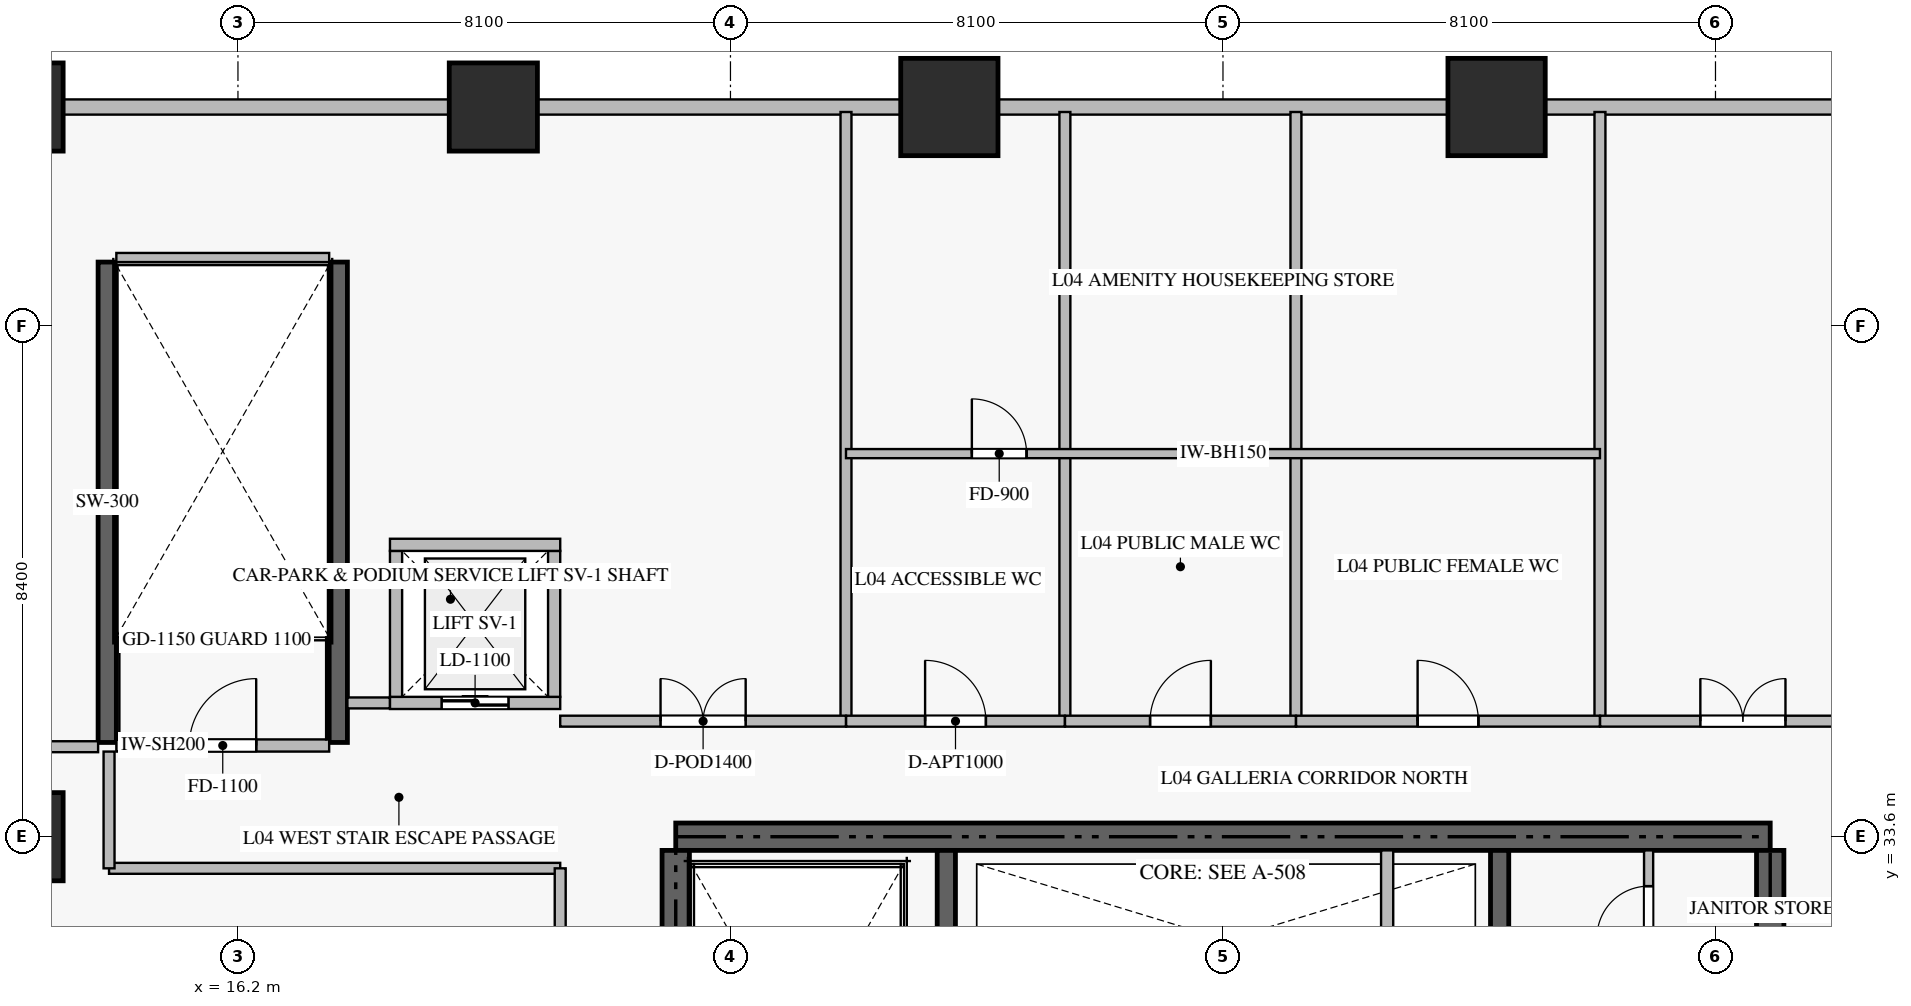
"""IFC4 building model, lengths in metres.
Left out: names, types, materials, properties, quantities, classifications, styles, units other than length and angle.
Written with IfcOpenShell. Run it as: python <this file> out.ifc"""

import sys

from ifc_helpers import new_model, si_unit, direction, frame, frame_2d, origin, origin_2d, place, context, subcontext, project, spatial, rectangle, extrude, source, transform, mapped, element, fill, save


model = new_model("IFC4")
c1 = context("Model", 3, precision=1e-05, world=origin(), true_north=direction((0.0, 1.0)))
c2 = subcontext(c1, "Body", "Model", "MODEL_VIEW")
j1 = project(units=[si_unit("LENGTHUNIT", "METRE"), si_unit("PLANEANGLEUNIT", "RADIAN")], contexts=[c1])
p1 = place(None, origin())
s1 = spatial("IfcSite", under=j1, at=p1, CompositionType="ELEMENT")
p2 = place(p1, origin())
s2 = spatial("IfcBuilding", under=s1, at=p2, CompositionType="ELEMENT")
p3 = place(p2, frame((0.0, 0.0, 21.0)))
s3 = spatial("IfcBuildingStorey", under=s2, at=p3, CompositionType="ELEMENT", Elevation=21.0)
p4 = place(p3, frame((41.4, 33.6, -0.85), z_axis=(0.0, 0.0, 1.0), x_axis=(-1.0, 0.0, 0.0)))
e1 = element("IfcWall", 1, at=p4, inside=s3, PredefinedType="SHEAR", context=c2, shape_type="SweptSolid", body=[
    extrude(rectangle(XDim=18.0, YDim=0.45, at=frame_2d((9.0, 0.0))), origin(), (0.0, 0.0, 1.0), 6.108),
])
p5 = place(p3, frame((23.4, 24.25, -0.85), z_axis=(0.0, 0.0, 1.0), x_axis=(0.0, 1.0, 0.0)))
e2 = element("IfcWall", 2, at=p5, inside=s3, PredefinedType="SHEAR", context=c2, shape_type="SweptSolid", body=[
    extrude(rectangle(XDim=9.125, YDim=0.45, at=frame_2d((4.562, 0.0))), origin(), (0.0, 0.0, 1.0), 6.108),
])
p6 = place(p3, frame((41.4, 27.75, -0.85), z_axis=(0.0, 0.0, 1.0), x_axis=(0.0, 1.0, 0.0)))
e3 = element("IfcWall", 3, at=p6, inside=s3, PredefinedType="SHEAR", context=c2, shape_type="SweptSolid", body=[
    extrude(rectangle(XDim=5.625, YDim=0.45, at=frame_2d((2.812, 0.0))), origin(), (0.0, 0.0, 1.0), 6.108),
])
p7 = place(p3, frame((27.85, 23.55, -0.85), z_axis=(0.0, 0.0, 1.0), x_axis=(0.0, 1.0, 0.0)))
e4 = element("IfcWall", 4, at=p7, inside=s3, PredefinedType="SHEAR", context=c2, shape_type="SweptSolid", body=[
    extrude(rectangle(XDim=9.825, YDim=0.3, at=frame_2d((4.913, 0.0))), origin(), (0.0, 0.0, 1.0), 6.108),
])
p8 = place(p3, frame((36.95, 27.05, -0.85), z_axis=(0.0, 0.0, 1.0), x_axis=(0.0, 1.0, 0.0)))
e5 = element("IfcWall", 5, at=p8, inside=s3, PredefinedType="SHEAR", context=c2, shape_type="SweptSolid", body=[
    extrude(rectangle(XDim=6.325, YDim=0.3, at=frame_2d((3.163, 0.0))), origin(), (0.0, 0.0, 1.0), 6.108),
])
m1 = source(origin(), c2, "Body", "SweptSolid", [
    extrude(rectangle(XDim=1.45, YDim=1.45, at=origin_2d()), origin(), (0.0, 0.0, 1.0), 6.11),
])
for number, where, z_axis, x_axis in (
    (6, (12.6, 45.6, -0.85), (0.0, 0.0, 1.0), (1.0, 0.0, 0.0)),
    (7, (20.4, 45.6, -0.85), (0.0, 0.0, 1.0), (1.0, 0.0, 0.0)),
):
    element("IfcColumn", number, at=place(p3, frame(where, z_axis=z_axis, x_axis=x_axis)), inside=s3, PredefinedType="COLUMN", context=c2, shape_type="MappedRepresentation", body=[
        mapped(m1, transform((0.0, 0.0, 0.0), scale=1.0)),
    ])
m2 = source(origin(), c2, "Body", "SweptSolid", [
    extrude(rectangle(XDim=1.6, YDim=1.6, at=origin_2d()), origin(), (0.0, 0.0, 1.0), 6.11),
])
for number, where, z_axis, x_axis in (
    (8, (27.9, 45.6, -0.85), (0.0, 0.0, 1.0), (1.0, 0.0, 0.0)),
    (9, (36.9, 45.6, -0.85), (0.0, 0.0, 1.0), (1.0, 0.0, 0.0)),
):
    element("IfcColumn", number, at=place(p3, frame(where, z_axis=z_axis, x_axis=x_axis)), inside=s3, PredefinedType="COLUMN", context=c2, shape_type="MappedRepresentation", body=[
        mapped(m2, transform((0.0, 0.0, 0.0), scale=1.0)),
    ])
p9 = place(p3, frame((12.6, 33.6, -0.85), z_axis=(0.0, 0.0, 1.0), x_axis=(1.0, 0.0, 0.0)))
e10 = element("IfcColumn", 10, at=p9, inside=s3, PredefinedType="COLUMN", context=c2, shape_type="MappedRepresentation", body=[
    mapped(m1, transform((0.0, 0.0, 0.0), scale=1.0)),
])
p10 = place(p3, frame((60.875, 45.6, 0.0), z_axis=(0.0, 0.0, 1.0), x_axis=(-1.0, 0.0, 0.0)))
e11 = element("IfcWall", 11, at=p10, inside=s3, PredefinedType="ELEMENTEDWALL", context=c2, shape_type="SweptSolid", body=[
    extrude(rectangle(XDim=56.95, YDim=0.25, at=frame_2d((28.475, 0.0))), origin(), (0.0, 0.0, 1.0), 2.845),
])
for number, where, z_axis, x_axis in (
    (12, (14.05, 35.15, -0.85), (0.0, 0.0, 1.0), (0.0, 1.0, 0.0)),
    (13, (17.85, 35.15, -0.85), (0.0, 0.0, 1.0), (0.0, 1.0, 0.0)),
):
    element("IfcWall", number, at=place(p3, frame(where, z_axis=z_axis, x_axis=x_axis)), inside=s3, PredefinedType="SHEAR", context=c2, shape_type="SweptSolid", body=[
        extrude(rectangle(XDim=7.9, YDim=0.3, at=frame_2d((3.95, 0.0))), origin(), (0.0, 0.0, 1.0), 6.108),
    ])
p11 = place(p3, frame((14.2, 35.1, 0.0), z_axis=(0.0, 0.0, 1.0), x_axis=(1.0, 0.0, 0.0)))
e14 = element("IfcWall", 14, at=p11, inside=s3, PredefinedType="STANDARD", context=c2, shape_type="SweptSolid", body=[
    extrude(rectangle(XDim=3.5, YDim=0.2, at=frame_2d((1.75, 0.0))), origin(), (0.0, 0.0, 1.0), 5.26),
])
p12 = place(p11, frame((1.2, 0.0, 0.0)))
e15 = element("IfcOpeningElement", 15, at=p12, cuts=e14, PredefinedType="OPENING", context=c2, shape_type="SweptSolid", body=[
    extrude(rectangle(XDim=1.1, YDim=2.15, at=frame_2d((0.55, 1.075))), frame((0.0, 0.11, 0.0), z_axis=(0.0, -1.0, 0.0), x_axis=(1.0, 0.0, 0.0)), (0.0, 0.0, 1.0), 0.22),
])
p13 = place(p3, frame((14.2, 43.1, 0.0), z_axis=(0.0, 0.0, 1.0), x_axis=(1.0, 0.0, 0.0)))
e16 = element("IfcWall", 16, at=p13, inside=s3, PredefinedType="STANDARD", context=c2, shape_type="SweptSolid", body=[
    extrude(rectangle(XDim=3.5, YDim=0.2, at=frame_2d((1.75, 0.0))), origin(), (0.0, 0.0, 1.0), 5.26),
])
p14 = place(p3, frame((35.1, 30.75, 0.0), z_axis=(0.0, 0.0, 1.0), x_axis=(0.0, 1.0, 0.0)))
e17 = element("IfcWall", 17, at=p14, inside=s3, PredefinedType="STANDARD", context=c2, shape_type="SweptSolid", body=[
    extrude(rectangle(XDim=2.625, YDim=0.2, at=frame_2d((1.312, 0.0))), origin(), (0.0, 0.0, 1.0), 5.26),
])
p15 = place(p3, frame((18.7, 35.8, 0.0), z_axis=(0.0, 0.0, 1.0), x_axis=(1.0, 0.0, 0.0)))
e18 = element("IfcWall", 18, at=p15, inside=s3, PredefinedType="STANDARD", context=c2, shape_type="SweptSolid", body=[
    extrude(rectangle(XDim=2.8, YDim=0.2, at=frame_2d((1.4, 0.0))), origin(), (0.0, 0.0, 1.0), 5.26),
])
p16 = place(p15, frame((0.85, 0.0, 0.0)))
e19 = element("IfcOpeningElement", 19, at=p16, cuts=e18, PredefinedType="OPENING", context=c2, shape_type="SweptSolid", body=[
    extrude(rectangle(XDim=1.1, YDim=2.2, at=frame_2d((0.55, 1.1))), frame((0.0, 0.11, 0.0), z_axis=(0.0, -1.0, 0.0), x_axis=(1.0, 0.0, 0.0)), (0.0, 0.0, 1.0), 0.22),
])
for number, where, z_axis, x_axis in (
    (20, (18.8, 35.9, 0.0), (0.0, 0.0, 1.0), (0.0, 1.0, 0.0)),
    (21, (21.4, 35.9, 0.0), (0.0, 0.0, 1.0), (0.0, 1.0, 0.0)),
):
    element("IfcWall", number, at=place(p3, frame(where, z_axis=z_axis, x_axis=x_axis)), inside=s3, PredefinedType="STANDARD", context=c2, shape_type="SweptSolid", body=[
        extrude(rectangle(XDim=2.4, YDim=0.2, at=frame_2d((1.2, 0.0))), origin(), (0.0, 0.0, 1.0), 5.26),
    ])
p17 = place(p3, frame((18.7, 38.4, 0.0), z_axis=(0.0, 0.0, 1.0), x_axis=(1.0, 0.0, 0.0)))
e22 = element("IfcWall", 22, at=p17, inside=s3, PredefinedType="STANDARD", context=c2, shape_type="SweptSolid", body=[
    extrude(rectangle(XDim=2.8, YDim=0.2, at=frame_2d((1.4, 0.0))), origin(), (0.0, 0.0, 1.0), 5.26),
])
p18 = place(p3, frame((39.4, 31.35, 0.0), z_axis=(0.0, 0.0, 1.0), x_axis=(0.0, 1.0, 0.0)))
e23 = element("IfcWall", 23, at=p18, inside=s3, PredefinedType="PARTITIONING", context=c2, shape_type="SweptSolid", body=[
    extrude(rectangle(XDim=2.025, YDim=0.15, at=frame_2d((1.012, 0.0))), origin(), (0.0, 0.0, 1.0), 5.26),
])
p19 = place(p18, frame((0.587, 0.0, 0.0)))
e24 = element("IfcOpeningElement", 24, at=p19, cuts=e23, PredefinedType="OPENING", context=c2, shape_type="SweptSolid", body=[
    extrude(rectangle(XDim=0.85, YDim=2.1, at=frame_2d((0.425, 1.05))), frame((0.0, 0.085, 0.0), z_axis=(0.0, -1.0, 0.0), x_axis=(1.0, 0.0, 0.0)), (0.0, 0.0, 1.0), 0.17),
])
p20 = place(p3, frame((4.132, 35.08, 0.0), z_axis=(0.0, 0.0, 1.0), x_axis=(1.0, 0.0, 0.0)))
e25 = element("IfcWall", 25, at=p20, inside=s3, PredefinedType="PARTITIONING", context=c2, shape_type="SweptSolid", body=[
    extrude(rectangle(XDim=9.768, YDim=0.18, at=frame_2d((4.884, 0.0))), origin(), (0.0, 0.0, 1.0), 5.26),
])
p21 = place(p3, frame((14.08, 33.08, 0.0), z_axis=(0.0, 0.0, 1.0), x_axis=(1.0, 0.0, 0.0)))
e26 = element("IfcWall", 26, at=p21, inside=s3, PredefinedType="PARTITIONING", context=c2, shape_type="SweptSolid", body=[
    extrude(rectangle(XDim=7.42, YDim=0.18, at=frame_2d((3.71, 0.0))), origin(), (0.0, 0.0, 1.0), 2.845),
])
p22 = place(p3, frame((18.0, 35.8, 0.0), z_axis=(0.0, 0.0, 1.0), x_axis=(1.0, 0.0, 0.0)))
e27 = element("IfcWall", 27, at=p22, inside=s3, PredefinedType="PARTITIONING", context=c2, shape_type="SweptSolid", body=[
    extrude(rectangle(XDim=0.698, YDim=0.18, at=frame_2d((0.349, 0.0))), origin(), (0.0, 0.0, 1.0), 5.26),
])
p23 = place(p3, frame((14.08, 33.08, 0.0), z_axis=(0.0, 0.0, 1.0), x_axis=(0.0, 1.0, 0.0)))
e28 = element("IfcWall", 28, at=p23, inside=s3, PredefinedType="PARTITIONING", context=c2, shape_type="SweptSolid", body=[
    extrude(rectangle(XDim=1.92, YDim=0.18, at=frame_2d((0.96, 0.0))), origin(), (0.0, 0.0, 1.0), 5.26),
])
p24 = place(p3, frame((21.5, 14.9, 0.0), z_axis=(0.0, 0.0, 1.0), x_axis=(0.0, 1.0, 0.0)))
e29 = element("IfcWall", 29, at=p24, inside=s3, PredefinedType="PARTITIONING", context=c2, shape_type="SweptSolid", body=[
    extrude(rectangle(XDim=18.18, YDim=0.18, at=frame_2d((9.09, 0.0))), origin(), (0.0, 0.0, 1.0), 5.26),
])
p25 = place(p24, frame((8.34, 0.0, 0.0)))
e30 = element("IfcOpeningElement", 30, at=p25, cuts=e29, PredefinedType="OPENING", context=c2, shape_type="SweptSolid", body=[
    extrude(rectangle(XDim=1.5, YDim=2.25, at=frame_2d((0.75, 1.125))), frame((0.0, 0.1, 0.0), z_axis=(0.0, -1.0, 0.0), x_axis=(1.0, 0.0, 0.0)), (0.0, 0.0, 1.0), 0.2),
])
for number, where, z_axis, x_axis in (
    (31, (26.2, 35.5, 0.0), (0.0, 0.0, 1.0), (0.0, 1.0, 0.0)),
    (32, (29.8, 35.5, 0.0), (0.0, 0.0, 1.0), (0.0, 1.0, 0.0)),
    (33, (33.6, 35.5, 0.0), (0.0, 0.0, 1.0), (0.0, 1.0, 0.0)),
    (34, (38.6, 35.5, 0.0), (0.0, 0.0, 1.0), (0.0, 1.0, 0.0)),
):
    element("IfcWall", number, at=place(p3, frame(where, z_axis=z_axis, x_axis=x_axis)), inside=s3, PredefinedType="PARTITIONING", context=c2, shape_type="SweptSolid", body=[
        extrude(rectangle(XDim=10.018, YDim=0.18, at=frame_2d((5.009, 0.0))), origin(), (0.0, 0.0, 1.0), 5.26),
    ])
p26 = place(p3, frame((21.5, 35.5, 0.0), z_axis=(0.0, 0.0, 1.0), x_axis=(1.0, 0.0, 0.0)))
e35 = element("IfcWall", 35, at=p26, inside=s3, PredefinedType="PARTITIONING", context=c2, shape_type="SweptSolid", body=[
    extrude(rectangle(XDim=4.7, YDim=0.18, at=frame_2d((2.35, 0.0))), origin(), (0.0, 0.0, 1.0), 5.26),
])
p27 = place(p26, frame((1.65, 0.0, 0.0)))
e36 = element("IfcOpeningElement", 36, at=p27, cuts=e35, PredefinedType="OPENING", context=c2, shape_type="SweptSolid", body=[
    extrude(rectangle(XDim=1.4, YDim=2.25, at=frame_2d((0.7, 1.125))), frame((0.0, 0.1, 0.0), z_axis=(0.0, -1.0, 0.0), x_axis=(1.0, 0.0, 0.0)), (0.0, 0.0, 1.0), 0.2),
])
p28 = place(p3, frame((26.202, 35.5, 0.0), z_axis=(0.0, 0.0, 1.0), x_axis=(1.0, 0.0, 0.0)))
e37 = element("IfcWall", 37, at=p28, inside=s3, PredefinedType="PARTITIONING", context=c2, shape_type="SweptSolid", body=[
    extrude(rectangle(XDim=3.598, YDim=0.18, at=frame_2d((1.799, 0.0))), origin(), (0.0, 0.0, 1.0), 5.26),
])
p29 = place(p28, frame((1.299, 0.0, 0.0)))
e38 = element("IfcOpeningElement", 38, at=p29, cuts=e37, PredefinedType="OPENING", context=c2, shape_type="SweptSolid", body=[
    extrude(rectangle(XDim=1.0, YDim=2.15, at=frame_2d((0.5, 1.075))), frame((0.0, 0.1, 0.0), z_axis=(0.0, -1.0, 0.0), x_axis=(1.0, 0.0, 0.0)), (0.0, 0.0, 1.0), 0.2),
])
p30 = place(p3, frame((29.802, 35.5, 0.0), z_axis=(0.0, 0.0, 1.0), x_axis=(1.0, 0.0, 0.0)))
e39 = element("IfcWall", 39, at=p30, inside=s3, PredefinedType="PARTITIONING", context=c2, shape_type="SweptSolid", body=[
    extrude(rectangle(XDim=3.798, YDim=0.18, at=frame_2d((1.899, 0.0))), origin(), (0.0, 0.0, 1.0), 5.26),
])
p31 = place(p30, frame((1.399, 0.0, 0.0)))
e40 = element("IfcOpeningElement", 40, at=p31, cuts=e39, PredefinedType="OPENING", context=c2, shape_type="SweptSolid", body=[
    extrude(rectangle(XDim=1.0, YDim=2.15, at=frame_2d((0.5, 1.075))), frame((0.0, 0.1, 0.0), z_axis=(0.0, -1.0, 0.0), x_axis=(1.0, 0.0, 0.0)), (0.0, 0.0, 1.0), 0.2),
])
p32 = place(p3, frame((33.602, 35.5, 0.0), z_axis=(0.0, 0.0, 1.0), x_axis=(1.0, 0.0, 0.0)))
e41 = element("IfcWall", 41, at=p32, inside=s3, PredefinedType="PARTITIONING", context=c2, shape_type="SweptSolid", body=[
    extrude(rectangle(XDim=4.998, YDim=0.18, at=frame_2d((2.499, 0.0))), origin(), (0.0, 0.0, 1.0), 5.26),
])
p33 = place(p32, frame((1.999, 0.0, 0.0)))
e42 = element("IfcOpeningElement", 42, at=p33, cuts=e41, PredefinedType="OPENING", context=c2, shape_type="SweptSolid", body=[
    extrude(rectangle(XDim=1.0, YDim=2.15, at=frame_2d((0.5, 1.075))), frame((0.0, 0.1, 0.0), z_axis=(0.0, -1.0, 0.0), x_axis=(1.0, 0.0, 0.0)), (0.0, 0.0, 1.0), 0.2),
])
p34 = place(p3, frame((38.602, 35.5, 0.0), z_axis=(0.0, 0.0, 1.0), x_axis=(1.0, 0.0, 0.0)))
e43 = element("IfcWall", 43, at=p34, inside=s3, PredefinedType="PARTITIONING", context=c2, shape_type="SweptSolid", body=[
    extrude(rectangle(XDim=4.698, YDim=0.18, at=frame_2d((2.349, 0.0))), origin(), (0.0, 0.0, 1.0), 5.26),
])
p35 = place(p34, frame((1.649, 0.0, 0.0)))
e44 = element("IfcOpeningElement", 44, at=p35, cuts=e43, PredefinedType="OPENING", context=c2, shape_type="SweptSolid", body=[
    extrude(rectangle(XDim=1.4, YDim=2.25, at=frame_2d((0.7, 1.125))), frame((0.0, 0.1, 0.0), z_axis=(0.0, -1.0, 0.0), x_axis=(1.0, 0.0, 0.0)), (0.0, 0.0, 1.0), 0.2),
])
p36 = place(p3, frame((26.2, 39.9, 0.0), z_axis=(0.0, 0.0, 1.0), x_axis=(1.0, 0.0, 0.0)))
e45 = element("IfcWall", 45, at=p36, inside=s3, PredefinedType="PARTITIONING", context=c2, shape_type="SweptSolid", body=[
    extrude(rectangle(XDim=12.4, YDim=0.15, at=frame_2d((6.2, 0.0))), origin(), (0.0, 0.0, 1.0), 5.26),
])
p37 = place(p36, frame((2.07, 0.0, 0.0)))
e46 = element("IfcOpeningElement", 46, at=p37, cuts=e45, PredefinedType="OPENING", context=c2, shape_type="SweptSolid", body=[
    extrude(rectangle(XDim=0.9, YDim=2.1, at=frame_2d((0.45, 1.05))), frame((0.0, 0.085, 0.0), z_axis=(0.0, -1.0, 0.0), x_axis=(1.0, 0.0, 0.0)), (0.0, 0.0, 1.0), 0.17),
])
m3 = source(origin(), c2, "Body", "SweptSolid", [
    extrude(rectangle(XDim=1.1, YDim=2.15, at=frame_2d((0.55, 1.075))), frame((0.0, 0.025, 0.0), z_axis=(0.0, -1.0, 0.0), x_axis=(1.0, 0.0, 0.0)), (0.0, 0.0, 1.0), 0.05),
])
p38 = place(p12, origin())
e47 = element("IfcDoor", 47, at=p38, inside=s3, OperationType="SINGLE_SWING_RIGHT", PredefinedType="DOOR", context=c2, shape_type="MappedRepresentation", body=[
    mapped(m3, transform((0.0, 0.0, 0.0), scale=1.0)),
])
fill(e15, e47)
m4 = source(origin(), c2, "Body", "SweptSolid", [
    extrude(rectangle(XDim=1.1, YDim=2.2, at=frame_2d((0.55, 1.1))), frame((0.0, 0.025, 0.0), z_axis=(0.0, -1.0, 0.0), x_axis=(1.0, 0.0, 0.0)), (0.0, 0.0, 1.0), 0.05),
])
p39 = place(p16, origin())
e48 = element("IfcDoor", 48, at=p39, inside=s3, OperationType="DOUBLE_DOOR_SLIDING", PredefinedType="DOOR", context=c2, shape_type="MappedRepresentation", body=[
    mapped(m4, transform((0.0, 0.0, 0.0), scale=1.0)),
])
fill(e19, e48)
m5 = source(origin(), c2, "Body", "SweptSolid", [
    extrude(rectangle(XDim=0.85, YDim=2.1, at=frame_2d((0.425, 1.05))), frame((0.0, 0.025, 0.0), z_axis=(0.0, -1.0, 0.0), x_axis=(1.0, 0.0, 0.0)), (0.0, 0.0, 1.0), 0.05),
])
p40 = place(p19, origin())
e49 = element("IfcDoor", 49, at=p40, inside=s3, OperationType="SINGLE_SWING_LEFT", PredefinedType="DOOR", context=c2, shape_type="MappedRepresentation", body=[
    mapped(m5, transform((0.0, 0.0, 0.0), scale=1.0)),
])
fill(e24, e49)
m6 = source(origin(), c2, "Body", "SweptSolid", [
    extrude(rectangle(XDim=1.4, YDim=2.25, at=frame_2d((0.7, 1.125))), frame((0.0, 0.025, 0.0), z_axis=(0.0, -1.0, 0.0), x_axis=(1.0, 0.0, 0.0)), (0.0, 0.0, 1.0), 0.05),
])
p41 = place(p27, origin())
e50 = element("IfcDoor", 50, at=p41, inside=s3, OperationType="DOUBLE_DOOR_SINGLE_SWING", PredefinedType="DOOR", context=c2, shape_type="MappedRepresentation", body=[
    mapped(m6, transform((0.0, 0.0, 0.0), scale=1.0)),
])
fill(e36, e50)
m7 = source(origin(), c2, "Body", "SweptSolid", [
    extrude(rectangle(XDim=1.0, YDim=2.15, at=frame_2d((0.5, 1.075))), frame((0.0, 0.025, 0.0), z_axis=(0.0, -1.0, 0.0), x_axis=(1.0, 0.0, 0.0)), (0.0, 0.0, 1.0), 0.05),
])
p42 = place(p29, origin())
e51 = element("IfcDoor", 51, at=p42, inside=s3, OperationType="SINGLE_SWING_LEFT", PredefinedType="DOOR", context=c2, shape_type="MappedRepresentation", body=[
    mapped(m7, transform((0.0, 0.0, 0.0), scale=1.0)),
])
fill(e38, e51)
p43 = place(p31, origin())
e52 = element("IfcDoor", 52, at=p43, inside=s3, OperationType="SINGLE_SWING_RIGHT", PredefinedType="DOOR", context=c2, shape_type="MappedRepresentation", body=[
    mapped(m7, transform((0.0, 0.0, 0.0), scale=1.0)),
])
fill(e40, e52)
p44 = place(p33, origin())
e53 = element("IfcDoor", 53, at=p44, inside=s3, OperationType="SINGLE_SWING_LEFT", PredefinedType="DOOR", context=c2, shape_type="MappedRepresentation", body=[
    mapped(m7, transform((0.0, 0.0, 0.0), scale=1.0)),
])
fill(e42, e53)
p45 = place(p35, origin())
e54 = element("IfcDoor", 54, at=p45, inside=s3, OperationType="DOUBLE_DOOR_SINGLE_SWING", PredefinedType="DOOR", context=c2, shape_type="MappedRepresentation", body=[
    mapped(m6, transform((0.0, 0.0, 0.0), scale=1.0)),
])
fill(e44, e54)
m8 = source(origin(), c2, "Body", "SweptSolid", [
    extrude(rectangle(XDim=0.9, YDim=2.1, at=frame_2d((0.45, 1.05))), frame((0.0, 0.025, 0.0), z_axis=(0.0, -1.0, 0.0), x_axis=(1.0, 0.0, 0.0)), (0.0, 0.0, 1.0), 0.05),
])
p46 = place(p37, origin())
e55 = element("IfcDoor", 55, at=p46, inside=s3, OperationType="SINGLE_SWING_LEFT", PredefinedType="DOOR", context=c2, shape_type="MappedRepresentation", body=[
    mapped(m8, transform((0.0, 0.0, 0.0), scale=1.0)),
])
fill(e46, e55)
save(model, sys.argv[1])
